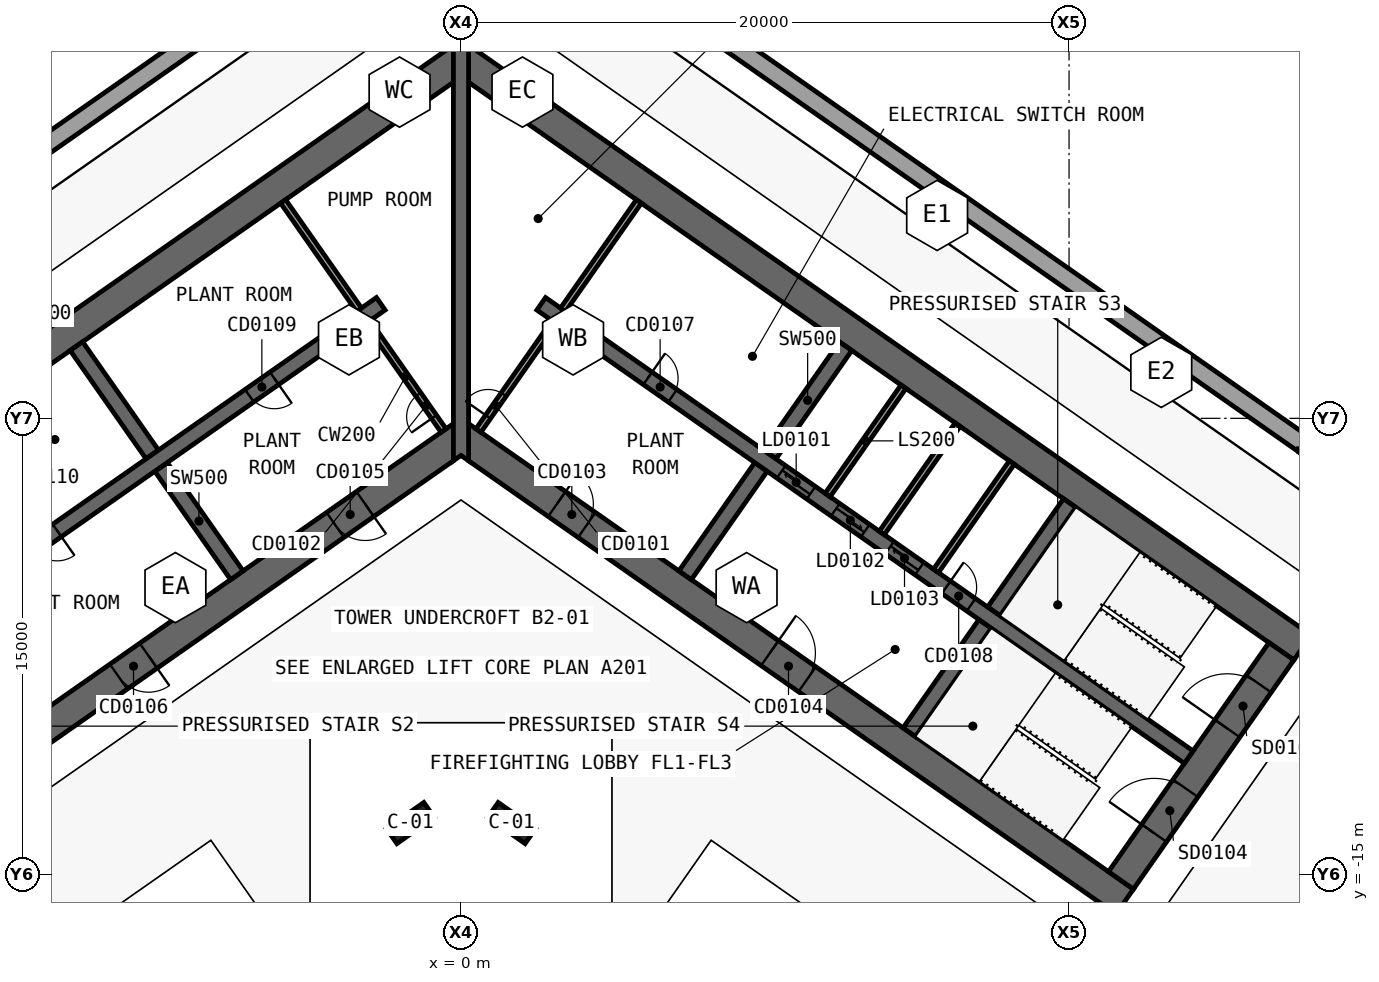
"""IFC4 building model, lengths in metres.
Left out: names, types, materials, properties, quantities, classifications, styles, units other than length and angle.
Written with IfcOpenShell. Run it as: python <this file> out.ifc"""

import sys

from ifc_helpers import new_model, si_unit, direction, frame, frame_2d, origin, origin_2d, place, context, subcontext, project, spatial, polyline, rectangle, outline, extrude, element, fill, save


model = new_model("IFC4")
c1 = context("Model", 3, precision=1e-05, world=origin(), true_north=direction((0.0, 1.0)))
c2 = subcontext(c1, "Body", "Model", "MODEL_VIEW")
j1 = project(units=[si_unit("LENGTHUNIT", "METRE"), si_unit("PLANEANGLEUNIT", "RADIAN")], contexts=[c1])
p1 = place(None, origin())
s1 = spatial("IfcSite", under=j1, at=p1, CompositionType="ELEMENT")
p2 = place(p1, origin())
s2 = spatial("IfcBuilding", under=s1, at=p2, CompositionType="ELEMENT")
p3 = place(p2, frame((0.0, 0.0, -9.0)))
s3 = spatial("IfcBuildingStorey", under=s2, at=p3, CompositionType="ELEMENT", Elevation=-9.0)
p4 = place(p3, frame((51.0, -1.3, 0.0), z_axis=(0.0, 0.0, 1.0), x_axis=(-1.0, 0.0, 0.0)))
e1 = element("IfcWall", 1, at=p4, inside=s3, PredefinedType="SOLIDWALL", context=c2, shape_type="SweptSolid", body=[
    extrude(outline(polyline([(22.738, 0.3), (23.448, -0.198), (23.448, -0.3), (22.548, -0.3), (0.6, -0.3), (0.6, 0.3), (22.738, 0.3)])), origin(), (0.0, 0.0, 1.0), 4.5),
])
p5 = place(p3, frame((28.28, -1.246, 0.0), z_axis=(0.0, 0.0, 1.0), x_axis=(-0.819154640404, 0.573572728697, 0.0)))
e2 = element("IfcWall", 2, at=p5, inside=s3, PredefinedType="SOLIDWALL", context=c2, shape_type="SweptSolid", body=[
    extrude(outline(polyline([(5.787, -0.3), (0.0, -0.3), (0.737, 0.216), (0.678, 0.3), (-0.189, 0.3), (34.951, 0.3), (34.733, -0.3), (5.787, -0.3)])), origin(), (0.0, 0.0, 1.0), 4.5),
])
p6 = place(p3, frame((0.172, 18.676, 0.0), z_axis=(0.0, 0.0, 1.0), x_axis=(-0.819154640404, -0.573572728697, 0.0)))
e3 = element("IfcWall", 3, at=p6, inside=s3, PredefinedType="SOLIDWALL", context=c2, shape_type="SweptSolid", body=[
    extrude(outline(polyline([(34.922, 0.3), (35.633, -0.198), (35.633, -0.3), (28.946, -0.3), (0.638, -0.3), (0.42, 0.3), (34.922, 0.3)])), origin(), (0.0, 0.0, 1.0), 4.5),
])
p7 = place(p3, frame((0.037, 11.867, 0.0), z_axis=(0.0, 0.0, 1.0), x_axis=(-0.819155306259, -0.573571777746, 0.0)))
e4 = element("IfcWall", 4, at=p7, inside=s3, PredefinedType="SHEAR", context=c2, shape_type="SweptSolid", body=[
    extrude(outline(polyline([(33.837, 0.5), (0.7, 0.5), (0.0, -0.5), (33.837, -0.5), (33.837, 0.5)])), origin(), (0.0, 0.0, 1.0), 4.5),
])
p8 = place(p3, frame((0.037, -0.585, 0.0), z_axis=(0.0, 0.0, 1.0), x_axis=(-0.819157152511, -0.573569140985, 0.0)))
e5 = element("IfcWall", 5, at=p8, inside=s3, PredefinedType="SHEAR", context=c2, shape_type="SweptSolid", body=[
    extrude(outline(polyline([(26.695, 0.5), (0.7, 0.5), (0.0, -0.5), (26.695, -0.5), (26.695, 0.5)])), origin(), (0.0, 0.0, 1.0), 4.5),
])
p9 = place(p8, frame((3.895, 0.0, 0.0)))
e6 = element("IfcOpeningElement", 6, at=p9, cuts=e5, PredefinedType="OPENING", context=c2, shape_type="SweptSolid", body=[
    extrude(rectangle(XDim=1.2, YDim=2.1, at=frame_2d((0.6, 1.05))), frame((0.0, 0.51, 0.0), z_axis=(0.0, -1.0, 0.0), x_axis=(1.0, 0.0, 0.0)), (0.0, 0.0, 1.0), 1.02),
])
p10 = place(p8, frame((12.595, 0.0, 0.0)))
e7 = element("IfcOpeningElement", 7, at=p10, cuts=e5, PredefinedType="OPENING", context=c2, shape_type="SweptSolid", body=[
    extrude(rectangle(XDim=1.2, YDim=2.1, at=frame_2d((0.6, 1.05))), frame((0.0, 0.51, 0.0), z_axis=(0.0, -1.0, 0.0), x_axis=(1.0, 0.0, 0.0)), (0.0, 0.0, 1.0), 1.02),
])
p11 = place(p3, frame((-7.372, -5.162, 0.0), z_axis=(0.0, 0.0, 1.0), x_axis=(-0.573594173421, 0.819139624372, 0.0)))
e8 = element("IfcWall", 8, at=p11, inside=s3, PredefinedType="SHEAR", context=c2, shape_type="SweptSolid", body=[
    extrude(outline(polyline([(4.35, 0.25), (0.0, 0.25), (0.0, -0.25), (4.35, -0.25), (4.35, 0.25)])), origin(), (0.0, 0.0, 1.0), 4.5),
])
p12 = place(p3, frame((-10.154, -1.189, 0.0), z_axis=(0.0, 0.0, 1.0), x_axis=(-0.573594173421, 0.819139624372, 0.0)))
e9 = element("IfcWall", 9, at=p12, inside=s3, PredefinedType="SHEAR", context=c2, shape_type="SweptSolid", body=[
    extrude(outline(polyline([(4.35, -0.25), (4.35, 0.25), (-0.0, 0.25), (-0.0, -0.25), (4.35, -0.25)])), origin(), (0.0, 0.0, 1.0), 4.5),
])
p13 = place(p3, frame((-2.638, 3.768, 0.0), z_axis=(0.0, 0.0, 1.0), x_axis=(-0.819148977158, -0.573580816643, 0.0)))
e10 = element("IfcWall", 10, at=p13, inside=s3, PredefinedType="SHEAR", context=c2, shape_type="SweptSolid", body=[
    extrude(outline(polyline([(26.0, 0.25), (0.0, 0.25), (0.0, -0.25), (26.0, -0.25), (26.0, 0.25)])), origin(), (0.0, 0.0, 1.0), 4.5),
])
p14 = place(p13, frame((4.275, 0.0, 0.0)))
e11 = element("IfcOpeningElement", 11, at=p14, cuts=e10, PredefinedType="OPENING", context=c2, shape_type="SweptSolid", body=[
    extrude(rectangle(XDim=1.0, YDim=2.1, at=frame_2d((0.5, 1.05))), frame((0.0, 0.26, 0.0), z_axis=(0.0, -1.0, 0.0), x_axis=(1.0, 0.0, 0.0)), (0.0, 0.0, 1.0), 0.52),
])
p15 = place(p13, frame((13.0, 0.0, 0.0)))
e12 = element("IfcOpeningElement", 12, at=p15, cuts=e10, PredefinedType="OPENING", context=c2, shape_type="SweptSolid", body=[
    extrude(rectangle(XDim=1.0, YDim=2.1, at=frame_2d((0.5, 1.05))), frame((0.0, 0.26, 0.0), z_axis=(0.0, -1.0, 0.0), x_axis=(1.0, 0.0, 0.0)), (0.0, 0.0, 1.0), 0.52),
])
p16 = place(p3, frame((-0.037, 11.867, 0.0), z_axis=(0.0, 0.0, 1.0), x_axis=(0.819155306259, -0.573571777746, 0.0)))
e13 = element("IfcWall", 13, at=p16, inside=s3, PredefinedType="SHEAR", context=c2, shape_type="SweptSolid", body=[
    extrude(outline(polyline([(33.837, 0.5), (0.0, 0.5), (0.7, -0.5), (33.837, -0.5), (33.837, 0.5)])), origin(), (0.0, 0.0, 1.0), 4.5),
])
p17 = place(p3, frame((-0.037, -0.585, 0.0), z_axis=(0.0, 0.0, 1.0), x_axis=(0.819157152511, -0.573569140985, 0.0)))
e14 = element("IfcWall", 14, at=p17, inside=s3, PredefinedType="SHEAR", context=c2, shape_type="SweptSolid", body=[
    extrude(outline(polyline([(26.695, 0.5), (0.0, 0.5), (0.7, -0.5), (26.695, -0.5), (26.695, 0.5)])), origin(), (0.0, 0.0, 1.0), 4.5),
])
p18 = place(p17, frame((3.895, 0.0, 0.0)))
e15 = element("IfcOpeningElement", 15, at=p18, cuts=e14, PredefinedType="OPENING", context=c2, shape_type="SweptSolid", body=[
    extrude(rectangle(XDim=1.2, YDim=2.1, at=frame_2d((0.6, 1.05))), frame((0.0, 0.51, 0.0), z_axis=(0.0, -1.0, 0.0), x_axis=(1.0, 0.0, 0.0)), (0.0, 0.0, 1.0), 1.02),
])
p19 = place(p17, frame((12.445, 0.0, 0.0)))
e16 = element("IfcOpeningElement", 16, at=p19, cuts=e14, PredefinedType="OPENING", context=c2, shape_type="SweptSolid", body=[
    extrude(rectangle(XDim=1.5, YDim=2.1, at=frame_2d((0.75, 1.05))), frame((0.0, 0.51, 0.0), z_axis=(0.0, -1.0, 0.0), x_axis=(1.0, 0.0, 0.0)), (0.0, 0.0, 1.0), 1.02),
])
p20 = place(p3, frame((21.708, -15.2, 0.0), z_axis=(0.0, 0.0, 1.0), x_axis=(0.573576324356, 0.819152122709, 0.0)))
e17 = element("IfcWall", 17, at=p20, inside=s3, PredefinedType="SHEAR", context=c2, shape_type="SweptSolid", body=[
    extrude(outline(polyline([(9.2, 0.5), (0.0, 0.5), (0.0, -0.5), (9.2, -0.5), (9.2, 0.5)])), origin(), (0.0, 0.0, 1.0), 4.5),
])
p21 = place(p20, frame((6.1, 0.0, 0.0)))
e18 = element("IfcOpeningElement", 18, at=p21, cuts=e17, PredefinedType="OPENING", context=c2, shape_type="SweptSolid", body=[
    extrude(rectangle(XDim=1.8, YDim=2.1, at=frame_2d((0.9, 1.05))), frame((0.0, 0.51, 0.0), z_axis=(0.0, -1.0, 0.0), x_axis=(1.0, 0.0, 0.0)), (0.0, 0.0, 1.0), 1.02),
])
p22 = place(p20, frame((1.9, 0.0, 0.0)))
e19 = element("IfcOpeningElement", 19, at=p22, cuts=e17, PredefinedType="OPENING", context=c2, shape_type="SweptSolid", body=[
    extrude(rectangle(XDim=1.8, YDim=2.1, at=frame_2d((0.9, 1.05))), frame((0.0, 0.51, 0.0), z_axis=(0.0, -1.0, 0.0), x_axis=(1.0, 0.0, 0.0)), (0.0, 0.0, 1.0), 1.02),
])
p23 = place(p3, frame((7.372, -5.162, 0.0), z_axis=(0.0, 0.0, 1.0), x_axis=(0.573594173421, 0.819139624372, 0.0)))
e20 = element("IfcWall", 20, at=p23, inside=s3, PredefinedType="SHEAR", context=c2, shape_type="SweptSolid", body=[
    extrude(outline(polyline([(0.0, 0.25), (0.0, -0.25), (4.35, -0.25), (4.35, 0.25), (0.0, 0.25)])), origin(), (0.0, 0.0, 1.0), 4.5),
])
p24 = place(p3, frame((10.154, -1.189, 0.0), z_axis=(0.0, 0.0, 1.0), x_axis=(0.573594173421, 0.819139624372, 0.0)))
e21 = element("IfcWall", 21, at=p24, inside=s3, PredefinedType="SHEAR", context=c2, shape_type="SweptSolid", body=[
    extrude(outline(polyline([(4.35, -0.25), (4.35, 0.25), (-0.0, 0.25), (-0.0, -0.25), (4.35, -0.25)])), origin(), (0.0, 0.0, 1.0), 4.5),
])
p25 = place(p3, frame((14.745, -10.324, 0.0), z_axis=(0.0, 0.0, 1.0), x_axis=(0.57356780395, 0.819158088694, 0.0)))
e22 = element("IfcWall", 22, at=p25, inside=s3, PredefinedType="SHEAR", context=c2, shape_type="SweptSolid", body=[
    extrude(outline(polyline([(0.0, 0.25), (0.0, -0.25), (4.35, -0.25), (4.35, 0.25), (0.0, 0.25)])), origin(), (0.0, 0.0, 1.0), 4.5),
])
p26 = place(p3, frame((17.527, -6.352, 0.0), z_axis=(0.0, 0.0, 1.0), x_axis=(0.573530143085, 0.819184457233, 0.0)))
e23 = element("IfcWall", 23, at=p26, inside=s3, PredefinedType="SHEAR", context=c2, shape_type="SweptSolid", body=[
    extrude(outline(polyline([(4.35, -0.25), (4.35, 0.25), (0.0, 0.25), (0.0, -0.25), (4.35, -0.25)])), origin(), (0.0, 0.0, 1.0), 4.5),
])
p27 = place(p3, frame((2.638, 3.768, 0.0), z_axis=(0.0, 0.0, 1.0), x_axis=(0.819148977158, -0.573580816643, 0.0)))
e24 = element("IfcWall", 24, at=p27, inside=s3, PredefinedType="SHEAR", context=c2, shape_type="SweptSolid", body=[
    extrude(outline(polyline([(0.0, 0.25), (0.0, -0.25), (26.0, -0.25), (26.0, 0.25), (0.0, 0.25)])), origin(), (0.0, 0.0, 1.0), 4.5),
])
p28 = place(p27, frame((4.275, 0.0, 0.0)))
e25 = element("IfcOpeningElement", 25, at=p28, cuts=e24, PredefinedType="OPENING", context=c2, shape_type="SweptSolid", body=[
    extrude(rectangle(XDim=1.0, YDim=2.1, at=frame_2d((0.5, 1.05))), frame((0.0, 0.26, 0.0), z_axis=(0.0, -1.0, 0.0), x_axis=(1.0, 0.0, 0.0)), (0.0, 0.0, 1.0), 0.52),
])
p29 = place(p27, frame((9.637, 0.0, 0.0)))
e26 = element("IfcOpeningElement", 26, at=p29, cuts=e24, PredefinedType="OPENING", context=c2, shape_type="SweptSolid", body=[
    extrude(rectangle(XDim=1.2, YDim=2.1, at=frame_2d((0.6, 1.05))), frame((0.0, 0.26, 0.0), z_axis=(0.0, -1.0, 0.0), x_axis=(1.0, 0.0, 0.0)), (0.0, 0.0, 1.0), 0.52),
])
p30 = place(p27, frame((11.812, 0.0, 0.0)))
e27 = element("IfcOpeningElement", 27, at=p30, cuts=e24, PredefinedType="OPENING", context=c2, shape_type="SweptSolid", body=[
    extrude(rectangle(XDim=1.2, YDim=2.1, at=frame_2d((0.6, 1.05))), frame((0.0, 0.26, 0.0), z_axis=(0.0, -1.0, 0.0), x_axis=(1.0, 0.0, 0.0)), (0.0, 0.0, 1.0), 0.52),
])
p31 = place(p27, frame((13.988, 0.0, 0.0)))
e28 = element("IfcOpeningElement", 28, at=p31, cuts=e24, PredefinedType="OPENING", context=c2, shape_type="SweptSolid", body=[
    extrude(rectangle(XDim=1.2, YDim=2.1, at=frame_2d((0.6, 1.05))), frame((0.0, 0.26, 0.0), z_axis=(0.0, -1.0, 0.0), x_axis=(1.0, 0.0, 0.0)), (0.0, 0.0, 1.0), 0.52),
])
p32 = place(p27, frame((16.262, 0.0, 0.0)))
e29 = element("IfcOpeningElement", 29, at=p32, cuts=e24, PredefinedType="OPENING", context=c2, shape_type="SweptSolid", body=[
    extrude(rectangle(XDim=1.0, YDim=2.1, at=frame_2d((0.5, 1.05))), frame((0.0, 0.26, 0.0), z_axis=(0.0, -1.0, 0.0), x_axis=(1.0, 0.0, 0.0)), (0.0, 0.0, 1.0), 0.52),
])
p33 = place(p3, frame((0.0, -1.396, 0.0), z_axis=(0.0, 0.0, 1.0), x_axis=(0.0, 1.0, 0.0)))
e30 = element("IfcWall", 30, at=p33, inside=s3, PredefinedType="SHEAR", context=c2, shape_type="SweptSolid", body=[
    extrude(outline(polyline([(0.0, -0.25), (0.175, -0.25), (1.221, -0.25), (12.452, -0.25), (13.848, -0.25), (13.857, -0.25), (13.968, -0.172), (13.848, 0.0), (13.968, 0.172), (13.857, 0.25), (13.848, 0.25), (12.452, 0.25), (1.221, 0.25), (0.175, 0.25), (0.0, 0.25), (0.175, 0.0), (0.0, -0.25)])), origin(), (0.0, 0.0, 1.0), 4.5),
])
for number, where, z_axis, x_axis in (
    (31, (-1.665, -13.313, 0.0), (0.0, 0.0, 1.0), (-0.819, -0.574, 0.0)),
    (32, (1.665, -13.313, 0.0), (0.0, 0.0, 1.0), (0.819, -0.574, 0.0)),
):
    element("IfcColumn", number, at=place(p3, frame(where, z_axis=z_axis, x_axis=x_axis)), inside=s3, PredefinedType="COLUMN", context=c2, shape_type="SweptSolid", body=[
        extrude(rectangle(XDim=1.5, YDim=0.6, at=origin_2d()), origin(), (0.0, 0.0, 1.0), 4.5),
    ])
p34 = place(p3, frame((12.059, -2.523, 0.0), z_axis=(0.0, 0.0, 1.0), x_axis=(0.573594173421, 0.819139624372, 0.0)))
e33 = element("IfcWall", 33, at=p34, inside=s3, PredefinedType="SOLIDWALL", context=c2, shape_type="SweptSolid", body=[
    extrude(rectangle(XDim=4.35, YDim=0.2, at=frame_2d((2.175, 0.0))), origin(), (0.0, 0.0, 1.0), 4.5),
])
p35 = place(p3, frame((13.84, -3.771, 0.0), z_axis=(0.0, 0.0, 1.0), x_axis=(0.57356780395, 0.819158088694, 0.0)))
e34 = element("IfcWall", 34, at=p35, inside=s3, PredefinedType="SOLIDWALL", context=c2, shape_type="SweptSolid", body=[
    extrude(rectangle(XDim=4.35, YDim=0.2, at=frame_2d((2.175, 0.0))), origin(), (0.0, 0.0, 1.0), 4.5),
])
p36 = place(p3, frame((15.622, -5.018, 0.0), z_axis=(0.0, 0.0, 1.0), x_axis=(0.573594173421, 0.819139624372, 0.0)))
e35 = element("IfcWall", 35, at=p36, inside=s3, PredefinedType="SOLIDWALL", context=c2, shape_type="SweptSolid", body=[
    extrude(rectangle(XDim=4.35, YDim=0.2, at=frame_2d((2.175, 0.0))), origin(), (0.0, 0.0, 1.0), 4.5),
])
p37 = place(p3, frame((-0.573, -0.402, 0.0), z_axis=(0.0, 0.0, 1.0), x_axis=(-0.57356780395, 0.819158088694, 0.0)))
e36 = element("IfcWall", 36, at=p37, inside=s3, PredefinedType="SOLIDWALL", context=c2, shape_type="SweptSolid", body=[
    extrude(rectangle(XDim=4.35, YDim=0.2, at=frame_2d((2.175, 0.0))), origin(), (0.0, 0.0, 1.0), 4.09),
])
p38 = place(p37, frame((0.55, 0.0, 0.0)))
e37 = element("IfcOpeningElement", 37, at=p38, cuts=e36, PredefinedType="OPENING", context=c2, shape_type="SweptSolid", body=[
    extrude(rectangle(XDim=0.9, YDim=2.1, at=frame_2d((0.45, 1.05))), frame((0.0, 0.11, 0.0), z_axis=(0.0, -1.0, 0.0), x_axis=(1.0, 0.0, 0.0)), (0.0, 0.0, 1.0), 0.22),
])
p39 = place(p3, frame((-3.355, 3.571, 0.0), z_axis=(0.0, 0.0, 1.0), x_axis=(-0.57356780395, 0.819158088694, 0.0)))
e38 = element("IfcWall", 38, at=p39, inside=s3, PredefinedType="SOLIDWALL", context=c2, shape_type="SweptSolid", body=[
    extrude(rectangle(XDim=4.35, YDim=0.2, at=frame_2d((2.175, 0.0))), origin(), (0.0, 0.0, 1.0), 4.09),
])
p40 = place(p3, frame((0.573, -0.402, 0.0), z_axis=(0.0, 0.0, 1.0), x_axis=(0.57356780395, 0.819158088694, 0.0)))
e39 = element("IfcWall", 39, at=p40, inside=s3, PredefinedType="SOLIDWALL", context=c2, shape_type="SweptSolid", body=[
    extrude(rectangle(XDim=4.35, YDim=0.2, at=frame_2d((2.175, 0.0))), origin(), (0.0, 0.0, 1.0), 4.09),
])
p41 = place(p40, frame((0.55, 0.0, 0.0)))
e40 = element("IfcOpeningElement", 40, at=p41, cuts=e39, PredefinedType="OPENING", context=c2, shape_type="SweptSolid", body=[
    extrude(rectangle(XDim=0.9, YDim=2.1, at=frame_2d((0.45, 1.05))), frame((0.0, 0.11, 0.0), z_axis=(0.0, -1.0, 0.0), x_axis=(1.0, 0.0, 0.0)), (0.0, 0.0, 1.0), 0.22),
])
p42 = place(p3, frame((3.355, 3.571, 0.0), z_axis=(0.0, 0.0, 1.0), x_axis=(0.57356780395, 0.819158088694, 0.0)))
e41 = element("IfcWall", 41, at=p42, inside=s3, PredefinedType="SOLIDWALL", context=c2, shape_type="SweptSolid", body=[
    extrude(rectangle(XDim=4.35, YDim=0.2, at=frame_2d((2.175, 0.0))), origin(), (0.0, 0.0, 1.0), 4.09),
])
p43 = place(p14, origin())
e42 = element("IfcDoor", 42, at=p43, inside=s3, OperationType="SINGLE_SWING_RIGHT", PredefinedType="DOOR", context=c2, shape_type="SweptSolid", body=[
    extrude(rectangle(XDim=1.0, YDim=2.1, at=frame_2d((0.5, 1.05))), frame((0.0, 0.025, 0.0), z_axis=(0.0, -1.0, 0.0), x_axis=(1.0, 0.0, 0.0)), (0.0, 0.0, 1.0), 0.05),
])
fill(e11, e42)
p44 = place(p15, origin())
e43 = element("IfcDoor", 43, at=p44, inside=s3, OperationType="SINGLE_SWING_RIGHT", PredefinedType="DOOR", context=c2, shape_type="SweptSolid", body=[
    extrude(rectangle(XDim=1.0, YDim=2.1, at=frame_2d((0.5, 1.05))), frame((0.0, 0.025, 0.0), z_axis=(0.0, -1.0, 0.0), x_axis=(1.0, 0.0, 0.0)), (0.0, 0.0, 1.0), 0.05),
])
fill(e12, e43)
p45 = place(p28, origin())
e44 = element("IfcDoor", 44, at=p45, inside=s3, OperationType="SINGLE_SWING_RIGHT", PredefinedType="DOOR", context=c2, shape_type="SweptSolid", body=[
    extrude(rectangle(XDim=1.0, YDim=2.1, at=frame_2d((0.5, 1.05))), frame((0.0, 0.025, 0.0), z_axis=(0.0, -1.0, 0.0), x_axis=(1.0, 0.0, 0.0)), (0.0, 0.0, 1.0), 0.05),
])
fill(e25, e44)
p46 = place(p29, origin())
e45 = element("IfcDoor", 45, at=p46, inside=s3, OperationType="SLIDING_TO_LEFT", PredefinedType="DOOR", context=c2, shape_type="SweptSolid", body=[
    extrude(rectangle(XDim=1.2, YDim=2.1, at=frame_2d((0.6, 1.05))), frame((0.0, 0.025, 0.0), z_axis=(0.0, -1.0, 0.0), x_axis=(1.0, 0.0, 0.0)), (0.0, 0.0, 1.0), 0.05),
])
fill(e26, e45)
p47 = place(p30, origin())
e46 = element("IfcDoor", 46, at=p47, inside=s3, OperationType="SLIDING_TO_RIGHT", PredefinedType="DOOR", context=c2, shape_type="SweptSolid", body=[
    extrude(rectangle(XDim=1.2, YDim=2.1, at=frame_2d((0.6, 1.05))), frame((0.0, 0.025, 0.0), z_axis=(0.0, -1.0, 0.0), x_axis=(1.0, 0.0, 0.0)), (0.0, 0.0, 1.0), 0.05),
])
fill(e27, e46)
p48 = place(p31, origin())
e47 = element("IfcDoor", 47, at=p48, inside=s3, OperationType="SLIDING_TO_LEFT", PredefinedType="DOOR", context=c2, shape_type="SweptSolid", body=[
    extrude(rectangle(XDim=1.2, YDim=2.1, at=frame_2d((0.6, 1.05))), frame((0.0, 0.025, 0.0), z_axis=(0.0, -1.0, 0.0), x_axis=(1.0, 0.0, 0.0)), (0.0, 0.0, 1.0), 0.05),
])
fill(e28, e47)
p49 = place(p32, origin())
e48 = element("IfcDoor", 48, at=p49, inside=s3, OperationType="SINGLE_SWING_RIGHT", PredefinedType="DOOR", context=c2, shape_type="SweptSolid", body=[
    extrude(rectangle(XDim=1.0, YDim=2.1, at=frame_2d((0.5, 1.05))), frame((0.0, 0.025, 0.0), z_axis=(0.0, -1.0, 0.0), x_axis=(1.0, 0.0, 0.0)), (0.0, 0.0, 1.0), 0.05),
])
fill(e29, e48)
p50 = place(p9, origin())
e49 = element("IfcDoor", 49, at=p50, inside=s3, OperationType="SINGLE_SWING_RIGHT", PredefinedType="DOOR", context=c2, shape_type="SweptSolid", body=[
    extrude(rectangle(XDim=1.2, YDim=2.1, at=frame_2d((0.6, 1.05))), frame((0.0, 0.025, 0.0), z_axis=(0.0, -1.0, 0.0), x_axis=(1.0, 0.0, 0.0)), (0.0, 0.0, 1.0), 0.05),
])
fill(e6, e49)
p51 = place(p10, origin())
e50 = element("IfcDoor", 50, at=p51, inside=s3, OperationType="SINGLE_SWING_RIGHT", PredefinedType="DOOR", context=c2, shape_type="SweptSolid", body=[
    extrude(rectangle(XDim=1.2, YDim=2.1, at=frame_2d((0.6, 1.05))), frame((0.0, 0.025, 0.0), z_axis=(0.0, -1.0, 0.0), x_axis=(1.0, 0.0, 0.0)), (0.0, 0.0, 1.0), 0.05),
])
fill(e7, e50)
p52 = place(p18, origin())
e51 = element("IfcDoor", 51, at=p52, inside=s3, OperationType="SINGLE_SWING_RIGHT", PredefinedType="DOOR", context=c2, shape_type="SweptSolid", body=[
    extrude(rectangle(XDim=1.2, YDim=2.1, at=frame_2d((0.6, 1.05))), frame((0.0, 0.025, 0.0), z_axis=(0.0, -1.0, 0.0), x_axis=(1.0, 0.0, 0.0)), (0.0, 0.0, 1.0), 0.05),
])
fill(e15, e51)
p53 = place(p19, origin())
e52 = element("IfcDoor", 52, at=p53, inside=s3, OperationType="DOUBLE_DOOR_SINGLE_SWING", PredefinedType="DOOR", context=c2, shape_type="SweptSolid", body=[
    extrude(rectangle(XDim=1.5, YDim=2.1, at=frame_2d((0.75, 1.05))), frame((0.0, 0.025, 0.0), z_axis=(0.0, -1.0, 0.0), x_axis=(1.0, 0.0, 0.0)), (0.0, 0.0, 1.0), 0.05),
])
fill(e16, e52)
p54 = place(p21, origin())
e53 = element("IfcDoor", 53, at=p54, inside=s3, OperationType="DOUBLE_DOOR_SINGLE_SWING", PredefinedType="DOOR", context=c2, shape_type="SweptSolid", body=[
    extrude(rectangle(XDim=1.8, YDim=2.1, at=frame_2d((0.9, 1.05))), frame((0.0, 0.025, 0.0), z_axis=(0.0, -1.0, 0.0), x_axis=(1.0, 0.0, 0.0)), (0.0, 0.0, 1.0), 0.05),
])
fill(e18, e53)
p55 = place(p22, origin())
e54 = element("IfcDoor", 54, at=p55, inside=s3, OperationType="DOUBLE_DOOR_SINGLE_SWING", PredefinedType="DOOR", context=c2, shape_type="SweptSolid", body=[
    extrude(rectangle(XDim=1.8, YDim=2.1, at=frame_2d((0.9, 1.05))), frame((0.0, 0.025, 0.0), z_axis=(0.0, -1.0, 0.0), x_axis=(1.0, 0.0, 0.0)), (0.0, 0.0, 1.0), 0.05),
])
fill(e19, e54)
p56 = place(p38, origin())
e55 = element("IfcDoor", 55, at=p56, inside=s3, OperationType="SINGLE_SWING_RIGHT", PredefinedType="DOOR", context=c2, shape_type="SweptSolid", body=[
    extrude(rectangle(XDim=0.9, YDim=2.1, at=frame_2d((0.45, 1.05))), frame((0.0, 0.025, 0.0), z_axis=(0.0, -1.0, 0.0), x_axis=(1.0, 0.0, 0.0)), (0.0, 0.0, 1.0), 0.05),
])
fill(e37, e55)
p57 = place(p41, origin())
e56 = element("IfcDoor", 56, at=p57, inside=s3, OperationType="SINGLE_SWING_RIGHT", PredefinedType="DOOR", context=c2, shape_type="SweptSolid", body=[
    extrude(rectangle(XDim=0.9, YDim=2.1, at=frame_2d((0.45, 1.05))), frame((0.0, 0.025, 0.0), z_axis=(0.0, -1.0, 0.0), x_axis=(1.0, 0.0, 0.0)), (0.0, 0.0, 1.0), 0.05),
])
fill(e40, e56)
save(model, sys.argv[1])
